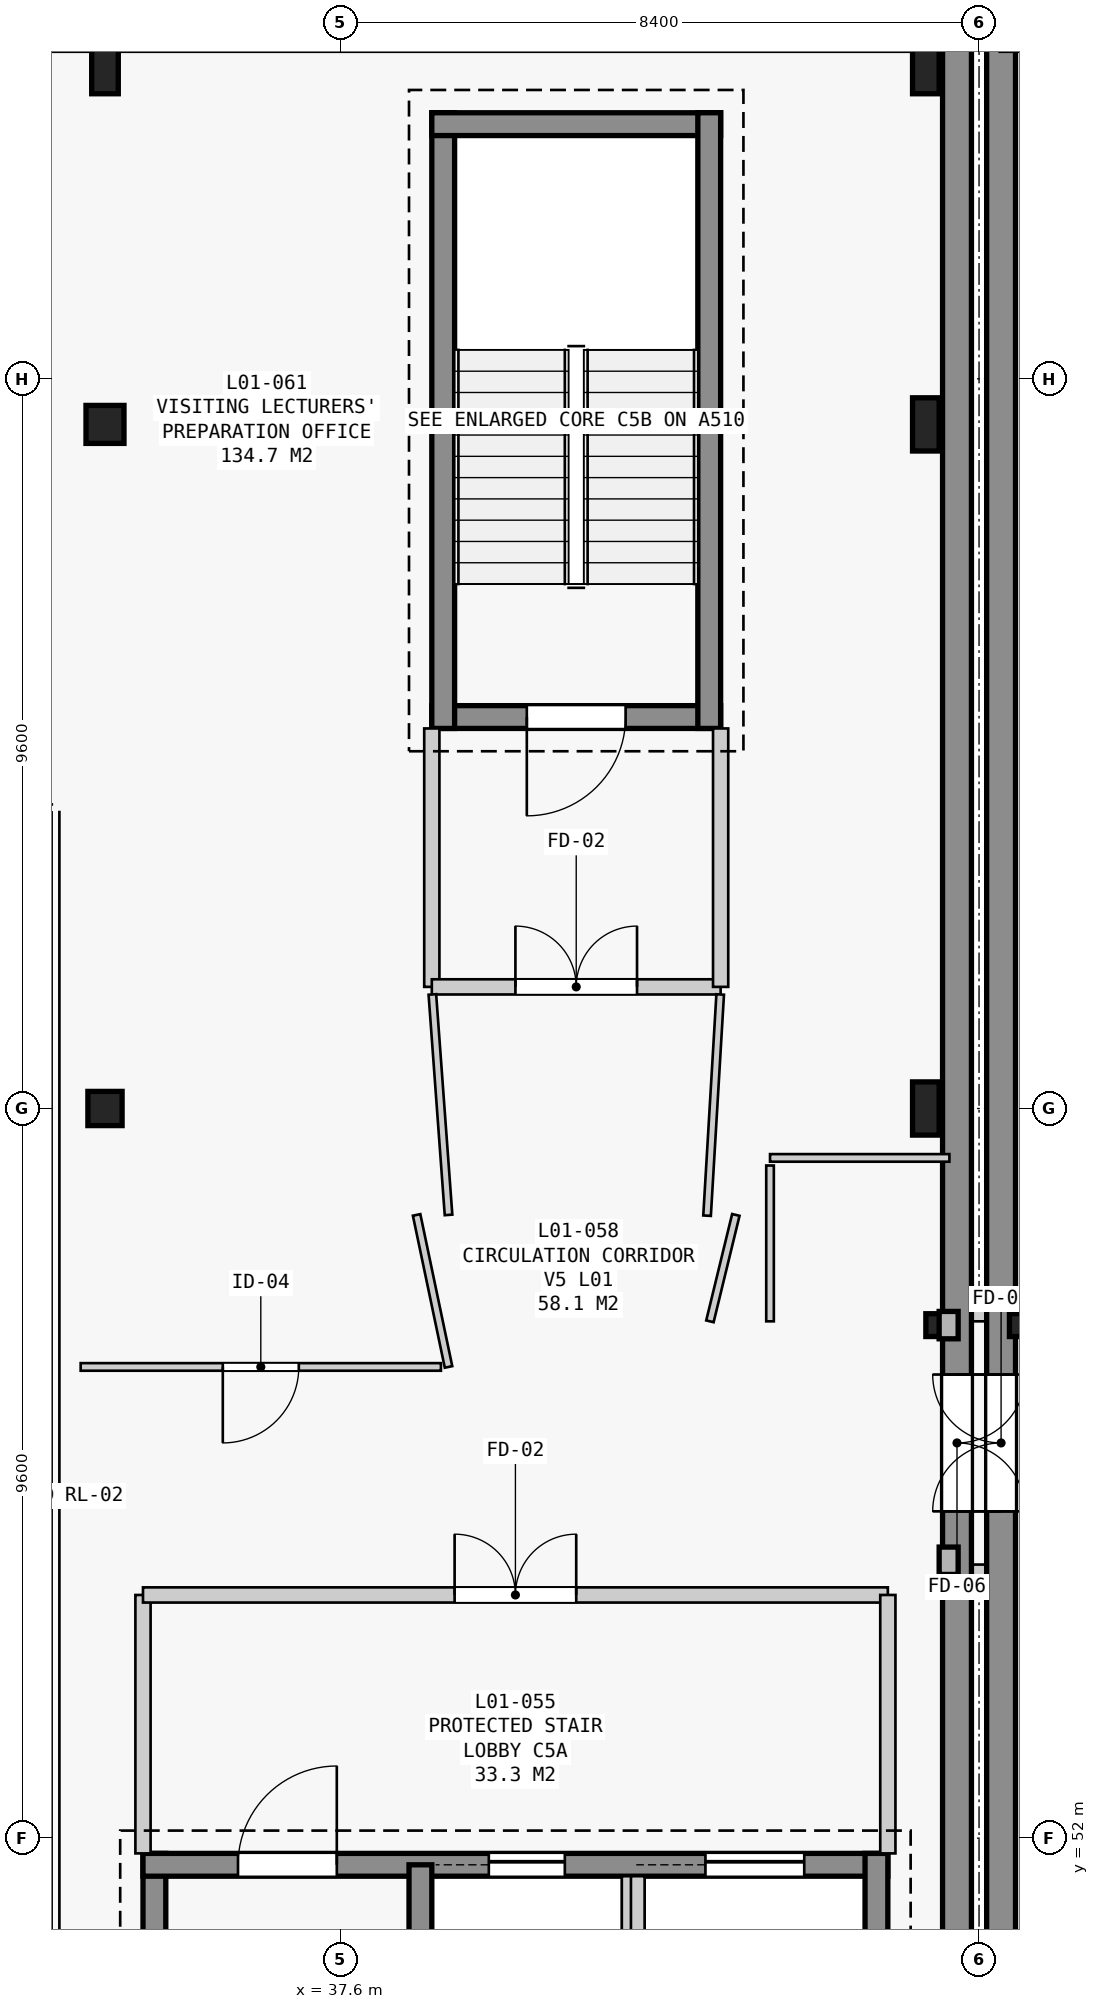
"""IFC4 building model, lengths in metres.
Left out: names, types, materials, properties, quantities, classifications, styles, units other than length and angle.
Written with IfcOpenShell. Run it as: python <this file> out.ifc"""

import sys

from ifc_helpers import new_model, si_unit, direction, frame, frame_2d, origin, origin_2d, place, context, subcontext, project, spatial, rectangle, i_section, extrude, element, fill, save


model = new_model("IFC4")
c1 = context("Model", 3, precision=1e-05, world=origin(), true_north=direction((0.0, 1.0)))
c2 = subcontext(c1, "Body", "Model", "MODEL_VIEW")
j1 = project(units=[si_unit("LENGTHUNIT", "METRE"), si_unit("PLANEANGLEUNIT", "RADIAN")], contexts=[c1])
p1 = place(None, origin())
s1 = spatial("IfcSite", under=j1, at=p1, CompositionType="ELEMENT")
p2 = place(p1, origin())
s2 = spatial("IfcBuilding", under=s1, at=p2, CompositionType="ELEMENT")
p3 = place(p2, frame((0.0, 0.0, 5.4)))
s3 = spatial("IfcBuildingStorey", under=s2, at=p3, CompositionType="ELEMENT", Elevation=5.4)
p4 = place(p3, frame((34.5, 61.6, 0.0), z_axis=(0.0, 0.0, 1.0), x_axis=(1.0, 0.0, 0.0)))
e1 = element("IfcColumn", 1, at=p4, inside=s3, PredefinedType="COLUMN", context=c2, shape_type="SweptSolid", body=[
    extrude(rectangle(XDim=0.45, YDim=0.45, at=origin_2d()), origin(), (0.0, 0.0, 1.0), 4.2),
])
p5 = place(p3, frame((34.5, 70.6, 0.0), z_axis=(0.0, 0.0, 1.0), x_axis=(1.0, 0.0, 0.0)))
e2 = element("IfcColumn", 2, at=p5, inside=s3, PredefinedType="COLUMN", context=c2, shape_type="SweptSolid", body=[
    extrude(rectangle(XDim=0.5, YDim=0.5, at=origin_2d()), origin(), (0.0, 0.0, 1.0), 4.2),
])
for number, where, z_axis, x_axis in (
    (3, (34.5, 75.3, 0.0), (0.0, 0.0, 1.0), (1.0, 0.0, 0.0)),
    (4, (45.3, 61.6, 0.0), (0.0, 0.0, 1.0), (1.0, 0.0, 0.0)),
    (5, (45.3, 70.6, 0.0), (0.0, 0.0, 1.0), (1.0, 0.0, 0.0)),
    (6, (45.3, 75.3, 0.0), (0.0, 0.0, 1.0), (1.0, 0.0, 0.0)),
):
    element("IfcColumn", number, at=place(p3, frame(where, z_axis=z_axis, x_axis=x_axis)), inside=s3, PredefinedType="COLUMN", context=c2, shape_type="SweptSolid", body=[
        extrude(rectangle(XDim=0.35, YDim=0.7, at=origin_2d()), origin(), (0.0, 0.0, 1.0), 4.2),
    ])
for number, where, z_axis, x_axis in (
    (7, (45.45, 58.75, 0.0), (0.0, 0.0, 1.0), (1.0, 0.0, 0.0)),
    (8, (46.55, 58.75, 0.0), (0.0, 0.0, 1.0), (1.0, 0.0, 0.0)),
):
    element("IfcColumn", number, at=place(p3, frame(where, z_axis=z_axis, x_axis=x_axis)), inside=s3, PredefinedType="COLUMN", context=c2, shape_type="SweptSolid", body=[
        extrude(i_section(OverallWidth=0.3, OverallDepth=0.3, WebThickness=0.011, FlangeThickness=0.019, FilletRadius=0.027, at=origin_2d()), origin(), (0.0, 0.0, 1.0), 4.2),
    ])
for number, where, z_axis, x_axis in (
    (9, (45.9, 55.5, 0.0), (0.0, 0.0, 1.0), (1.0, 0.0, 0.0)),
    (10, (45.9, 58.9, 0.0), (0.0, 0.0, 1.0), (1.0, 0.0, 0.0)),
):
    element("IfcWall", number, at=place(p3, frame(where, z_axis=z_axis, x_axis=x_axis)), inside=s3, PredefinedType="STANDARD", context=c2, shape_type="SweptSolid", body=[
        extrude(rectangle(XDim=0.2, YDim=0.2, at=frame_2d((0.1, 0.0))), origin(), (0.0, 0.0, 1.0), 3.94),
    ])
p6 = place(p3, frame((46.29, 42.69, 0.0), z_axis=(0.0, 0.0, 1.0), x_axis=(0.0, 1.0, 0.0)))
e11 = element("IfcWall", 11, at=p6, inside=s3, PredefinedType="STANDARD", context=c2, shape_type="SweptSolid", body=[
    extrude(rectangle(XDim=33.02, YDim=0.38, at=frame_2d((16.51, 0.0))), origin(), (0.0, 0.0, 1.0), 3.94),
])
p7 = place(p6, frame((13.61, 0.0, 0.0)))
e12 = element("IfcOpeningElement", 12, at=p7, cuts=e11, PredefinedType="OPENING", context=c2, shape_type="SweptSolid", body=[
    extrude(rectangle(XDim=1.8, YDim=2.2, at=frame_2d((0.9, 1.1))), frame((0.0, 0.2, 0.0), z_axis=(0.0, -1.0, 0.0), x_axis=(1.0, 0.0, 0.0)), (0.0, 0.0, 1.0), 0.4),
])
p8 = place(p3, frame((45.71, 75.71, 0.0), z_axis=(0.0, 0.0, 1.0), x_axis=(0.0, -1.0, 0.0)))
e13 = element("IfcWall", 13, at=p8, inside=s3, PredefinedType="STANDARD", context=c2, shape_type="SweptSolid", body=[
    extrude(rectangle(XDim=33.02, YDim=0.38, at=frame_2d((16.51, 0.0))), origin(), (0.0, 0.0, 1.0), 3.94),
])
p9 = place(p8, frame((17.61, 0.0, 0.0)))
e14 = element("IfcOpeningElement", 14, at=p9, cuts=e13, PredefinedType="OPENING", context=c2, shape_type="SweptSolid", body=[
    extrude(rectangle(XDim=1.8, YDim=2.2, at=frame_2d((0.9, 1.1))), frame((0.0, 0.2, 0.0), z_axis=(0.0, -1.0, 0.0), x_axis=(1.0, 0.0, 0.0)), (0.0, 0.0, 1.0), 0.4),
])
p10 = place(p3, frame((35.15, 43.7, 0.0), z_axis=(0.0, 0.0, 1.0), x_axis=(0.0, 1.0, 0.0)))
e15 = element("IfcWall", 15, at=p10, inside=s3, PredefinedType="SHEAR", context=c2, shape_type="SweptSolid", body=[
    extrude(rectangle(XDim=8.1, YDim=0.3, at=frame_2d((4.05, 0.0))), origin(), (0.0, 0.0, 1.0), 3.94),
])
p11 = place(p3, frame((35.0, 51.65, 0.0), z_axis=(0.0, 0.0, 1.0), x_axis=(1.0, 0.0, 0.0)))
e16 = element("IfcWall", 16, at=p11, inside=s3, PredefinedType="SHEAR", context=c2, shape_type="SweptSolid", body=[
    extrude(rectangle(XDim=9.8, YDim=0.3, at=frame_2d((4.9, 0.0))), origin(), (0.0, 0.0, 1.0), 3.94),
])
p12 = place(p11, frame((1.25, 0.0, 0.0)))
e17 = element("IfcOpeningElement", 17, at=p12, cuts=e16, PredefinedType="OPENING", context=c2, shape_type="SweptSolid", body=[
    extrude(rectangle(XDim=1.3, YDim=2.2, at=frame_2d((0.65, 1.1))), frame((0.0, 0.16, 0.0), z_axis=(0.0, -1.0, 0.0), x_axis=(1.0, 0.0, 0.0)), (0.0, 0.0, 1.0), 0.32),
])
p13 = place(p11, frame((4.55, 0.0, 0.0)))
e18 = element("IfcOpeningElement", 18, at=p13, cuts=e16, PredefinedType="OPENING", context=c2, shape_type="SweptSolid", body=[
    extrude(rectangle(XDim=1.0, YDim=2.15, at=frame_2d((0.5, 1.075))), frame((0.0, 0.16, 0.0), z_axis=(0.0, -1.0, 0.0), x_axis=(1.0, 0.0, 0.0)), (0.0, 0.0, 1.0), 0.32),
])
p14 = place(p11, frame((7.4, 0.0, 0.0)))
e19 = element("IfcOpeningElement", 19, at=p14, cuts=e16, PredefinedType="OPENING", context=c2, shape_type="SweptSolid", body=[
    extrude(rectangle(XDim=1.3, YDim=2.2, at=frame_2d((0.65, 1.1))), frame((0.0, 0.16, 0.0), z_axis=(0.0, -1.0, 0.0), x_axis=(1.0, 0.0, 0.0)), (0.0, 0.0, 1.0), 0.32),
])
p15 = place(p3, frame((44.65, 51.8, 0.0), z_axis=(0.0, 0.0, 1.0), x_axis=(0.0, -1.0, 0.0)))
e20 = element("IfcWall", 20, at=p15, inside=s3, PredefinedType="SHEAR", context=c2, shape_type="SweptSolid", body=[
    extrude(rectangle(XDim=8.1, YDim=0.3, at=frame_2d((4.05, 0.0))), origin(), (0.0, 0.0, 1.0), 3.94),
])
p16 = place(p3, frame((38.65, 43.85, 0.0), z_axis=(0.0, 0.0, 1.0), x_axis=(0.0, 1.0, 0.0)))
e21 = element("IfcWall", 21, at=p16, inside=s3, PredefinedType="SHEAR", context=c2, shape_type="SweptSolid", body=[
    extrude(rectangle(XDim=7.8, YDim=0.3, at=frame_2d((3.9, 0.0))), origin(), (0.0, 0.0, 1.0), 3.94),
])
p17 = place(p3, frame((41.39, 48.7, 0.0), z_axis=(0.0, 0.0, 1.0), x_axis=(0.0, 1.0, 0.0)))
e22 = element("IfcWall", 22, at=p17, inside=s3, PredefinedType="PARTITIONING", context=c2, shape_type="SweptSolid", body=[
    extrude(rectangle(XDim=2.8, YDim=0.18, at=frame_2d((1.4, 0.0))), origin(), (0.0, 0.0, 1.0), 3.94),
])
p18 = place(p3, frame((41.51, 48.2, 0.0), z_axis=(0.0, 0.0, 1.0), x_axis=(0.0, 1.0, 0.0)))
e23 = element("IfcWall", 23, at=p18, inside=s3, PredefinedType="PARTITIONING", context=c2, shape_type="SweptSolid", body=[
    extrude(rectangle(XDim=3.3, YDim=0.18, at=frame_2d((1.65, 0.0))), origin(), (0.0, 0.0, 1.0), 3.94),
])
p19 = place(p3, frame((35.0, 51.8, 0.0), z_axis=(0.0, 0.0, 1.0), x_axis=(0.0, 1.0, 0.0)))
e24 = element("IfcWall", 24, at=p19, inside=s3, PredefinedType="STANDARD", context=c2, shape_type="SweptSolid", body=[
    extrude(rectangle(XDim=3.4, YDim=0.2, at=frame_2d((1.7, 0.0))), origin(), (0.0, 0.0, 1.0), 3.94),
])
p20 = place(p3, frame((35.0, 55.2, 0.0), z_axis=(0.0, 0.0, 1.0), x_axis=(1.0, 0.0, 0.0)))
e25 = element("IfcWall", 25, at=p20, inside=s3, PredefinedType="STANDARD", context=c2, shape_type="SweptSolid", body=[
    extrude(rectangle(XDim=9.8, YDim=0.2, at=frame_2d((4.9, 0.0))), origin(), (0.0, 0.0, 1.0), 3.94),
])
p21 = place(p20, frame((4.1, 0.0, 0.0)))
e26 = element("IfcOpeningElement", 26, at=p21, cuts=e25, PredefinedType="OPENING", context=c2, shape_type="SweptSolid", body=[
    extrude(rectangle(XDim=1.6, YDim=2.2, at=frame_2d((0.8, 1.1))), frame((0.0, 0.11, 0.0), z_axis=(0.0, -1.0, 0.0), x_axis=(1.0, 0.0, 0.0)), (0.0, 0.0, 1.0), 0.22),
])
p22 = place(p3, frame((44.8, 55.2, 0.0), z_axis=(0.0, 0.0, 1.0), x_axis=(0.0, -1.0, 0.0)))
e27 = element("IfcWall", 27, at=p22, inside=s3, PredefinedType="STANDARD", context=c2, shape_type="SweptSolid", body=[
    extrude(rectangle(XDim=3.4, YDim=0.2, at=frame_2d((1.7, 0.0))), origin(), (0.0, 0.0, 1.0), 3.94),
])
p23 = place(p3, frame((42.6, 66.75, 0.0), z_axis=(0.0, 0.0, 1.0), x_axis=(-1.0, 0.0, 0.0)))
e28 = element("IfcWall", 28, at=p23, inside=s3, PredefinedType="SHEAR", context=c2, shape_type="SweptSolid", body=[
    extrude(rectangle(XDim=3.8, YDim=0.3, at=frame_2d((1.9, 0.0))), origin(), (0.0, 0.0, 1.0), 3.94),
])
p24 = place(p23, frame((1.25, 0.0, 0.0)))
e29 = element("IfcOpeningElement", 29, at=p24, cuts=e28, PredefinedType="OPENING", context=c2, shape_type="SweptSolid", body=[
    extrude(rectangle(XDim=1.3, YDim=2.2, at=frame_2d((0.65, 1.1))), frame((0.0, 0.16, 0.0), z_axis=(0.0, -1.0, 0.0), x_axis=(1.0, 0.0, 0.0)), (0.0, 0.0, 1.0), 0.32),
])
p25 = place(p3, frame((38.95, 66.6, 0.0), z_axis=(0.0, 0.0, 1.0), x_axis=(0.0, 1.0, 0.0)))
e30 = element("IfcWall", 30, at=p25, inside=s3, PredefinedType="SHEAR", context=c2, shape_type="SweptSolid", body=[
    extrude(rectangle(XDim=8.1, YDim=0.3, at=frame_2d((4.05, 0.0))), origin(), (0.0, 0.0, 1.0), 3.94),
])
p26 = place(p3, frame((38.8, 74.55, 0.0), z_axis=(0.0, 0.0, 1.0), x_axis=(1.0, 0.0, 0.0)))
e31 = element("IfcWall", 31, at=p26, inside=s3, PredefinedType="SHEAR", context=c2, shape_type="SweptSolid", body=[
    extrude(rectangle(XDim=3.8, YDim=0.3, at=frame_2d((1.9, 0.0))), origin(), (0.0, 0.0, 1.0), 3.94),
])
p27 = place(p3, frame((42.45, 74.7, 0.0), z_axis=(0.0, 0.0, 1.0), x_axis=(0.0, -1.0, 0.0)))
e32 = element("IfcWall", 32, at=p27, inside=s3, PredefinedType="SHEAR", context=c2, shape_type="SweptSolid", body=[
    extrude(rectangle(XDim=8.1, YDim=0.3, at=frame_2d((4.05, 0.0))), origin(), (0.0, 0.0, 1.0), 3.94),
])
p28 = place(p3, frame((38.8, 66.6, 0.0), z_axis=(0.0, 0.0, 1.0), x_axis=(0.0, -1.0, 0.0)))
e33 = element("IfcWall", 33, at=p28, inside=s3, PredefinedType="STANDARD", context=c2, shape_type="SweptSolid", body=[
    extrude(rectangle(XDim=3.4, YDim=0.2, at=frame_2d((1.7, 0.0))), origin(), (0.0, 0.0, 1.0), 3.94),
])
p29 = place(p3, frame((38.8, 63.2, 0.0), z_axis=(0.0, 0.0, 1.0), x_axis=(1.0, 0.0, 0.0)))
e34 = element("IfcWall", 34, at=p29, inside=s3, PredefinedType="STANDARD", context=c2, shape_type="SweptSolid", body=[
    extrude(rectangle(XDim=3.8, YDim=0.2, at=frame_2d((1.9, 0.0))), origin(), (0.0, 0.0, 1.0), 3.94),
])
p30 = place(p29, frame((1.1, 0.0, 0.0)))
e35 = element("IfcOpeningElement", 35, at=p30, cuts=e34, PredefinedType="OPENING", context=c2, shape_type="SweptSolid", body=[
    extrude(rectangle(XDim=1.6, YDim=2.2, at=frame_2d((0.8, 1.1))), frame((0.0, 0.11, 0.0), z_axis=(0.0, -1.0, 0.0), x_axis=(1.0, 0.0, 0.0)), (0.0, 0.0, 1.0), 0.22),
])
p31 = place(p3, frame((42.6, 63.2, 0.0), z_axis=(0.0, 0.0, 1.0), x_axis=(0.0, 1.0, 0.0)))
e36 = element("IfcWall", 36, at=p31, inside=s3, PredefinedType="STANDARD", context=c2, shape_type="SweptSolid", body=[
    extrude(rectangle(XDim=3.4, YDim=0.2, at=frame_2d((1.7, 0.0))), origin(), (0.0, 0.0, 1.0), 3.94),
])
p32 = place(p3, frame((45.61, 60.95, 0.0), z_axis=(0.0, 0.0, 1.0), x_axis=(-1.0, 0.0, 0.0)))
e37 = element("IfcWall", 37, at=p32, inside=s3, PredefinedType="PARTITIONING", context=c2, shape_type="SweptSolid", body=[
    extrude(rectangle(XDim=2.36, YDim=0.1, at=frame_2d((1.18, 0.0))), origin(), (0.0, 0.0, 1.0), 3.94),
])
p33 = place(p3, frame((43.25, 60.85, 0.0), z_axis=(0.0, 0.0, 1.0), x_axis=(0.0, -1.0, 0.0)))
e38 = element("IfcWall", 38, at=p33, inside=s3, PredefinedType="PARTITIONING", context=c2, shape_type="SweptSolid", body=[
    extrude(rectangle(XDim=2.05, YDim=0.1, at=frame_2d((1.025, 0.0))), origin(), (0.0, 0.0, 1.0), 3.94),
])
p34 = place(p3, frame((42.459, 58.8, 0.0), z_axis=(0.0, 0.0, 1.0), x_axis=(0.236710429431, 0.971580245064, 0.0)))
e39 = element("IfcWall", 39, at=p34, inside=s3, PredefinedType="PARTITIONING", context=c2, shape_type="SweptSolid", body=[
    extrude(rectangle(XDim=1.441, YDim=0.1, at=frame_2d((0.72, 0.0))), origin(), (0.0, 0.0, 1.0), 3.94),
])
p35 = place(p3, frame((42.421, 60.19, 0.0), z_axis=(0.0, 0.0, 1.0), x_axis=(0.059203078041, 0.998245959446, 0.0)))
e40 = element("IfcWall", 40, at=p35, inside=s3, PredefinedType="PARTITIONING", context=c2, shape_type="SweptSolid", body=[
    extrude(rectangle(XDim=2.916, YDim=0.1, at=frame_2d((1.458, 0.0))), origin(), (0.0, 0.0, 1.0), 3.22),
])
p36 = place(p3, frame((38.807, 63.1, 0.0), z_axis=(0.0, 0.0, 1.0), x_axis=(0.073120239762, -0.997323132459, 0.0)))
e41 = element("IfcWall", 41, at=p36, inside=s3, PredefinedType="PARTITIONING", context=c2, shape_type="SweptSolid", body=[
    extrude(rectangle(XDim=2.908, YDim=0.1, at=frame_2d((1.454, 0.0))), origin(), (0.0, 0.0, 1.0), 3.22),
])
p37 = place(p3, frame((38.6, 60.2, 0.0), z_axis=(0.0, 0.0, 1.0), x_axis=(0.205480619879, -0.978661184912, 0.0)))
e42 = element("IfcWall", 42, at=p37, inside=s3, PredefinedType="PARTITIONING", context=c2, shape_type="SweptSolid", body=[
    extrude(rectangle(XDim=2.044, YDim=0.1, at=frame_2d((1.022, 0.0))), origin(), (0.0, 0.0, 1.0), 3.94),
])
p38 = place(p3, frame((38.92, 58.2, 0.0), z_axis=(0.0, 0.0, 1.0), x_axis=(-1.0, 0.0, 0.0)))
e43 = element("IfcWall", 43, at=p38, inside=s3, PredefinedType="PARTITIONING", context=c2, shape_type="SweptSolid", body=[
    extrude(rectangle(XDim=4.74, YDim=0.1, at=frame_2d((2.37, 0.0))), origin(), (0.0, 0.0, 1.0), 3.94),
])
p39 = place(p38, frame((1.87, 0.0, 0.0)))
e44 = element("IfcOpeningElement", 44, at=p39, cuts=e43, PredefinedType="OPENING", context=c2, shape_type="SweptSolid", body=[
    extrude(rectangle(XDim=1.0, YDim=2.15, at=frame_2d((0.5, 1.075))), frame((0.0, 0.06, 0.0), z_axis=(0.0, -1.0, 0.0), x_axis=(1.0, 0.0, 0.0)), (0.0, 0.0, 1.0), 0.12),
])
p40 = place(p7, origin())
e45 = element("IfcDoor", 45, at=p40, inside=s3, OperationType="DOUBLE_DOOR_SINGLE_SWING", PredefinedType="DOOR", context=c2, shape_type="SweptSolid", body=[
    extrude(rectangle(XDim=1.8, YDim=2.2, at=frame_2d((0.9, 1.1))), frame((0.0, 0.025, 0.0), z_axis=(0.0, -1.0, 0.0), x_axis=(1.0, 0.0, 0.0)), (0.0, 0.0, 1.0), 0.05),
])
fill(e12, e45)
p41 = place(p9, origin())
e46 = element("IfcDoor", 46, at=p41, inside=s3, OperationType="DOUBLE_DOOR_SINGLE_SWING", PredefinedType="DOOR", context=c2, shape_type="SweptSolid", body=[
    extrude(rectangle(XDim=1.8, YDim=2.2, at=frame_2d((0.9, 1.1))), frame((0.0, 0.025, 0.0), z_axis=(0.0, -1.0, 0.0), x_axis=(1.0, 0.0, 0.0)), (0.0, 0.0, 1.0), 0.05),
])
fill(e14, e46)
p42 = place(p12, origin())
e47 = element("IfcDoor", 47, at=p42, inside=s3, OperationType="SINGLE_SWING_RIGHT", PredefinedType="DOOR", context=c2, shape_type="SweptSolid", body=[
    extrude(rectangle(XDim=1.3, YDim=2.2, at=frame_2d((0.65, 1.1))), frame((0.0, 0.025, 0.0), z_axis=(0.0, -1.0, 0.0), x_axis=(1.0, 0.0, 0.0)), (0.0, 0.0, 1.0), 0.05),
])
fill(e17, e47)
p43 = place(p13, origin())
e48 = element("IfcDoor", 48, at=p43, inside=s3, OperationType="SLIDING_TO_LEFT", PredefinedType="DOOR", context=c2, shape_type="SweptSolid", body=[
    extrude(rectangle(XDim=1.0, YDim=2.15, at=frame_2d((0.5, 1.075))), frame((0.0, 0.025, 0.0), z_axis=(0.0, -1.0, 0.0), x_axis=(1.0, 0.0, 0.0)), (0.0, 0.0, 1.0), 0.05),
])
fill(e18, e48)
p44 = place(p14, origin())
e49 = element("IfcDoor", 49, at=p44, inside=s3, OperationType="SLIDING_TO_LEFT", PredefinedType="DOOR", context=c2, shape_type="SweptSolid", body=[
    extrude(rectangle(XDim=1.3, YDim=2.2, at=frame_2d((0.65, 1.1))), frame((0.0, 0.025, 0.0), z_axis=(0.0, -1.0, 0.0), x_axis=(1.0, 0.0, 0.0)), (0.0, 0.0, 1.0), 0.05),
])
fill(e19, e49)
p45 = place(p24, origin())
e50 = element("IfcDoor", 50, at=p45, inside=s3, OperationType="SINGLE_SWING_RIGHT", PredefinedType="DOOR", context=c2, shape_type="SweptSolid", body=[
    extrude(rectangle(XDim=1.3, YDim=2.2, at=frame_2d((0.65, 1.1))), frame((0.0, 0.025, 0.0), z_axis=(0.0, -1.0, 0.0), x_axis=(1.0, 0.0, 0.0)), (0.0, 0.0, 1.0), 0.05),
])
fill(e29, e50)
p46 = place(p21, origin())
e51 = element("IfcDoor", 51, at=p46, inside=s3, OperationType="DOUBLE_DOOR_SINGLE_SWING", PredefinedType="DOOR", context=c2, shape_type="SweptSolid", body=[
    extrude(rectangle(XDim=1.6, YDim=2.2, at=frame_2d((0.8, 1.1))), frame((0.0, 0.025, 0.0), z_axis=(0.0, -1.0, 0.0), x_axis=(1.0, 0.0, 0.0)), (0.0, 0.0, 1.0), 0.05),
])
fill(e26, e51)
p47 = place(p30, origin())
e52 = element("IfcDoor", 52, at=p47, inside=s3, OperationType="DOUBLE_DOOR_SINGLE_SWING", PredefinedType="DOOR", context=c2, shape_type="SweptSolid", body=[
    extrude(rectangle(XDim=1.6, YDim=2.2, at=frame_2d((0.8, 1.1))), frame((0.0, 0.025, 0.0), z_axis=(0.0, -1.0, 0.0), x_axis=(1.0, 0.0, 0.0)), (0.0, 0.0, 1.0), 0.05),
])
fill(e35, e52)
p48 = place(p39, origin())
e53 = element("IfcDoor", 53, at=p48, inside=s3, OperationType="SINGLE_SWING_RIGHT", PredefinedType="DOOR", context=c2, shape_type="SweptSolid", body=[
    extrude(rectangle(XDim=1.0, YDim=2.15, at=frame_2d((0.5, 1.075))), frame((0.0, 0.025, 0.0), z_axis=(0.0, -1.0, 0.0), x_axis=(1.0, 0.0, 0.0)), (0.0, 0.0, 1.0), 0.05),
])
fill(e44, e53)
save(model, sys.argv[1])
